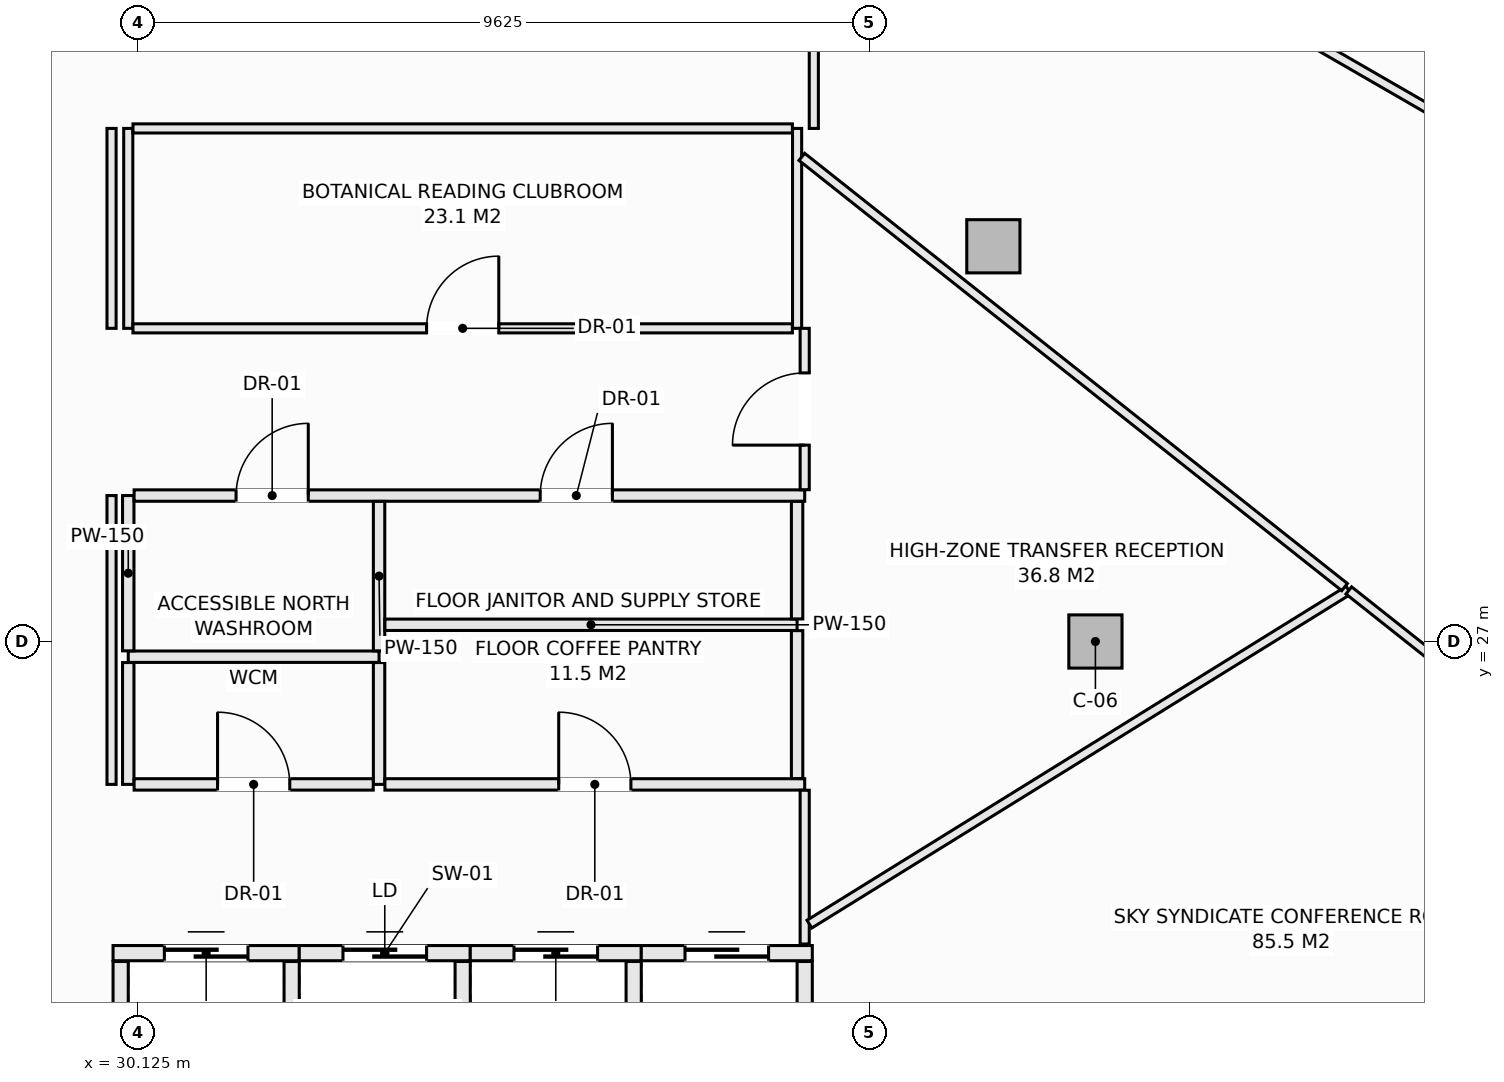
"""IFC4 building model, lengths in metres.
Left out: names, types, materials, properties, quantities, classifications, styles, units other than length and angle.
Written with IfcOpenShell. Run it as: python <this file> out.ifc"""

import sys

from ifc_helpers import new_model, si_unit, direction, frame, frame_2d, origin, origin_2d, place, context, subcontext, project, spatial, rectangle, extrude, element, fill, save


model = new_model("IFC4")
c1 = context("Model", 3, precision=1e-05, world=origin(), true_north=direction((0.0, 1.0)))
c2 = subcontext(c1, "Body", "Model", "MODEL_VIEW")
j1 = project(units=[si_unit("LENGTHUNIT", "METRE"), si_unit("PLANEANGLEUNIT", "RADIAN")], contexts=[c1])
p1 = place(None, origin())
s1 = spatial("IfcSite", under=j1, at=p1, CompositionType="ELEMENT")
p2 = place(p1, origin())
s2 = spatial("IfcBuilding", under=s1, at=p2, CompositionType="ELEMENT")
p3 = place(p2, frame((0.0, 0.0, 191.9)))
s3 = spatial("IfcBuildingStorey", under=s2, at=p3, CompositionType="ELEMENT", Elevation=191.9)
for number, where, z_axis, x_axis in (
    (1, (42.725, 27.0, -0.28), (0.0, 0.0, 1.0), (1.0, 0.0, 0.0)),
    (2, (41.382, 32.199, -0.28), (0.0, 0.0, 1.0), (1.0, 0.0, 0.0)),
):
    element("IfcColumn", number, at=place(p3, frame(where, z_axis=z_axis, x_axis=x_axis)), inside=s3, PredefinedType="COLUMN", context=c2, shape_type="SweptSolid", body=[
        extrude(rectangle(XDim=0.7, YDim=0.7, at=origin_2d()), origin(), (0.0, 0.0, 1.0), 4.51),
    ])
p4 = place(p3, frame((29.8, 22.9, 0.0), z_axis=(0.0, 0.0, 1.0), x_axis=(1.0, 0.0, 0.0)))
e3 = element("IfcWall", 3, at=p4, inside=s3, PredefinedType="SOLIDWALL", context=c2, shape_type="SweptSolid", body=[
    extrude(rectangle(XDim=2.45, YDim=0.2, at=frame_2d((1.225, 0.0))), origin(), (0.0, 0.0, 1.0), 4.23),
])
p5 = place(p4, frame((0.675, 0.0, 0.0)))
e4 = element("IfcOpeningElement", 4, at=p5, cuts=e3, PredefinedType="OPENING", context=c2, shape_type="SweptSolid", body=[
    extrude(rectangle(XDim=1.1, YDim=2.2, at=frame_2d((0.55, 1.1))), frame((0.0, 0.11, 0.0), z_axis=(0.0, -1.0, 0.0), x_axis=(1.0, 0.0, 0.0)), (0.0, 0.0, 1.0), 0.22),
])
for number, where, z_axis, x_axis in (
    (5, (29.9, 20.36, 0.0), (0.0, 0.0, 1.0), (0.0, 1.0, 0.0)),
    (6, (32.15, 20.36, 0.0), (0.0, 0.0, 1.0), (0.0, 1.0, 0.0)),
):
    element("IfcWall", number, at=place(p3, frame(where, z_axis=z_axis, x_axis=x_axis)), inside=s3, PredefinedType="SOLIDWALL", context=c2, shape_type="SweptSolid", body=[
        extrude(rectangle(XDim=2.43, YDim=0.2, at=frame_2d((1.215, 0.0))), origin(), (0.0, 0.0, 1.0), 4.23),
    ])
p6 = place(p3, frame((32.25, 22.9, 0.0), z_axis=(0.0, 0.0, 1.0), x_axis=(1.0, 0.0, 0.0)))
e7 = element("IfcWall", 7, at=p6, inside=s3, PredefinedType="SOLIDWALL", context=c2, shape_type="SweptSolid", body=[
    extrude(rectangle(XDim=2.25, YDim=0.2, at=frame_2d((1.125, 0.0))), origin(), (0.0, 0.0, 1.0), 4.23),
])
p7 = place(p6, frame((0.575, 0.0, 0.0)))
e8 = element("IfcOpeningElement", 8, at=p7, cuts=e7, PredefinedType="OPENING", context=c2, shape_type="SweptSolid", body=[
    extrude(rectangle(XDim=1.1, YDim=2.2, at=frame_2d((0.55, 1.1))), frame((0.0, 0.11, 0.0), z_axis=(0.0, -1.0, 0.0), x_axis=(1.0, 0.0, 0.0)), (0.0, 0.0, 1.0), 0.22),
])
p8 = place(p3, frame((34.4, 20.36, 0.0), z_axis=(0.0, 0.0, 1.0), x_axis=(0.0, 1.0, 0.0)))
e9 = element("IfcWall", 9, at=p8, inside=s3, PredefinedType="SOLIDWALL", context=c2, shape_type="SweptSolid", body=[
    extrude(rectangle(XDim=2.43, YDim=0.2, at=frame_2d((1.215, 0.0))), origin(), (0.0, 0.0, 1.0), 4.23),
])
p9 = place(p3, frame((34.5, 22.9, 0.0), z_axis=(0.0, 0.0, 1.0), x_axis=(1.0, 0.0, 0.0)))
e10 = element("IfcWall", 10, at=p9, inside=s3, PredefinedType="SOLIDWALL", context=c2, shape_type="SweptSolid", body=[
    extrude(rectangle(XDim=2.25, YDim=0.2, at=frame_2d((1.125, 0.0))), origin(), (0.0, 0.0, 1.0), 4.23),
])
p10 = place(p9, frame((0.575, 0.0, 0.0)))
e11 = element("IfcOpeningElement", 11, at=p10, cuts=e10, PredefinedType="OPENING", context=c2, shape_type="SweptSolid", body=[
    extrude(rectangle(XDim=1.1, YDim=2.2, at=frame_2d((0.55, 1.1))), frame((0.0, 0.11, 0.0), z_axis=(0.0, -1.0, 0.0), x_axis=(1.0, 0.0, 0.0)), (0.0, 0.0, 1.0), 0.22),
])
p11 = place(p3, frame((36.65, 20.36, 0.0), z_axis=(0.0, 0.0, 1.0), x_axis=(0.0, 1.0, 0.0)))
e12 = element("IfcWall", 12, at=p11, inside=s3, PredefinedType="SOLIDWALL", context=c2, shape_type="SweptSolid", body=[
    extrude(rectangle(XDim=2.43, YDim=0.2, at=frame_2d((1.215, 0.0))), origin(), (0.0, 0.0, 1.0), 4.23),
])
p12 = place(p3, frame((36.75, 22.9, 0.0), z_axis=(0.0, 0.0, 1.0), x_axis=(1.0, 0.0, 0.0)))
e13 = element("IfcWall", 13, at=p12, inside=s3, PredefinedType="SOLIDWALL", context=c2, shape_type="SweptSolid", body=[
    extrude(rectangle(XDim=2.25, YDim=0.2, at=frame_2d((1.125, 0.0))), origin(), (0.0, 0.0, 1.0), 4.23),
])
p13 = place(p12, frame((0.575, 0.0, 0.0)))
e14 = element("IfcOpeningElement", 14, at=p13, cuts=e13, PredefinedType="OPENING", context=c2, shape_type="SweptSolid", body=[
    extrude(rectangle(XDim=1.1, YDim=2.2, at=frame_2d((0.55, 1.1))), frame((0.0, 0.11, 0.0), z_axis=(0.0, -1.0, 0.0), x_axis=(1.0, 0.0, 0.0)), (0.0, 0.0, 1.0), 0.22),
])
p14 = place(p3, frame((38.9, 20.36, 0.0), z_axis=(0.0, 0.0, 1.0), x_axis=(0.0, 1.0, 0.0)))
e15 = element("IfcWall", 15, at=p14, inside=s3, PredefinedType="SOLIDWALL", context=c2, shape_type="SweptSolid", body=[
    extrude(rectangle(XDim=2.43, YDim=0.2, at=frame_2d((1.215, 0.0))), origin(), (0.0, 0.0, 1.0), 4.23),
])
p15 = place(p3, frame((30.0, 26.8, 0.0), z_axis=(0.0, 0.0, 1.0), x_axis=(1.0, 0.0, 0.0)))
e16 = element("IfcWall", 16, at=p15, inside=s3, PredefinedType="PARTITIONING", context=c2, shape_type="SweptSolid", body=[
    extrude(rectangle(XDim=3.3, YDim=0.15, at=frame_2d((1.65, 0.0))), origin(), (0.0, 0.0, 1.0), 4.23),
])
p16 = place(p3, frame((30.0, 25.12, 0.0), z_axis=(0.0, 0.0, 1.0), x_axis=(0.0, 1.0, 0.0)))
e17 = element("IfcWall", 17, at=p16, inside=s3, PredefinedType="PARTITIONING", context=c2, shape_type="SweptSolid", body=[
    extrude(rectangle(XDim=1.603, YDim=0.15, at=frame_2d((0.801, 0.0))), origin(), (0.0, 0.0, 1.0), 4.23),
])
p17 = place(p3, frame((30.0, 26.877, 0.0), z_axis=(0.0, 0.0, 1.0), x_axis=(0.0, 1.0, 0.0)))
e18 = element("IfcWall", 18, at=p17, inside=s3, PredefinedType="PARTITIONING", context=c2, shape_type="SweptSolid", body=[
    extrude(rectangle(XDim=2.043, YDim=0.15, at=frame_2d((1.021, 0.0))), origin(), (0.0, 0.0, 1.0), 4.23),
])
p18 = place(p3, frame((30.0, 31.12, 0.0), z_axis=(0.0, 0.0, 1.0), x_axis=(0.0, 1.0, 0.0)))
e19 = element("IfcWall", 19, at=p18, inside=s3, PredefinedType="PARTITIONING", context=c2, shape_type="SweptSolid", body=[
    extrude(rectangle(XDim=2.63, YDim=0.12, at=frame_2d((1.315, 0.0))), origin(), (0.0, 0.0, 1.0), 4.23),
])
p19 = place(p3, frame((30.077, 28.92, 0.0), z_axis=(0.0, 0.0, 1.0), x_axis=(1.0, 0.0, 0.0)))
e20 = element("IfcWall", 20, at=p19, inside=s3, PredefinedType="PARTITIONING", context=c2, shape_type="SweptSolid", body=[
    extrude(rectangle(XDim=8.823, YDim=0.15, at=frame_2d((4.412, 0.0))), origin(), (0.0, 0.0, 1.0), 4.23),
])
p20 = place(p19, frame((1.342, 0.0, 0.0)))
e21 = element("IfcOpeningElement", 21, at=p20, cuts=e20, PredefinedType="OPENING", context=c2, shape_type="SweptSolid", body=[
    extrude(rectangle(XDim=0.95, YDim=2.1, at=frame_2d((0.475, 1.05))), frame((0.0, 0.085, 0.0), z_axis=(0.0, -1.0, 0.0), x_axis=(1.0, 0.0, 0.0)), (0.0, 0.0, 1.0), 0.17),
])
p21 = place(p19, frame((5.343, 0.0, 0.0)))
e22 = element("IfcOpeningElement", 22, at=p21, cuts=e20, PredefinedType="OPENING", context=c2, shape_type="SweptSolid", body=[
    extrude(rectangle(XDim=0.95, YDim=2.1, at=frame_2d((0.475, 1.05))), frame((0.0, 0.085, 0.0), z_axis=(0.0, -1.0, 0.0), x_axis=(1.0, 0.0, 0.0)), (0.0, 0.0, 1.0), 0.17),
])
p22 = place(p3, frame((33.3, 25.12, 0.0), z_axis=(0.0, 0.0, 1.0), x_axis=(0.0, 1.0, 0.0)))
e23 = element("IfcWall", 23, at=p22, inside=s3, PredefinedType="PARTITIONING", context=c2, shape_type="SweptSolid", body=[
    extrude(rectangle(XDim=1.603, YDim=0.15, at=frame_2d((0.801, 0.0))), origin(), (0.0, 0.0, 1.0), 4.23),
])
p23 = place(p3, frame((33.3, 26.877, 0.0), z_axis=(0.0, 0.0, 1.0), x_axis=(0.0, 1.0, 0.0)))
e24 = element("IfcWall", 24, at=p23, inside=s3, PredefinedType="PARTITIONING", context=c2, shape_type="SweptSolid", body=[
    extrude(rectangle(XDim=1.966, YDim=0.15, at=frame_2d((0.983, 0.0))), origin(), (0.0, 0.0, 1.0), 4.23),
])
p24 = place(p3, frame((30.077, 25.12, 0.0), z_axis=(0.0, 0.0, 1.0), x_axis=(1.0, 0.0, 0.0)))
e25 = element("IfcWall", 25, at=p24, inside=s3, PredefinedType="PARTITIONING", context=c2, shape_type="SweptSolid", body=[
    extrude(rectangle(XDim=3.146, YDim=0.15, at=frame_2d((1.573, 0.0))), origin(), (0.0, 0.0, 1.0), 4.23),
])
p25 = place(p24, frame((1.098, 0.0, 0.0)))
e26 = element("IfcOpeningElement", 26, at=p25, cuts=e25, PredefinedType="OPENING", context=c2, shape_type="SweptSolid", body=[
    extrude(rectangle(XDim=0.95, YDim=2.1, at=frame_2d((0.475, 1.05))), frame((0.0, 0.085, 0.0), z_axis=(0.0, -1.0, 0.0), x_axis=(1.0, 0.0, 0.0)), (0.0, 0.0, 1.0), 0.17),
])
p26 = place(p3, frame((33.377, 25.12, 0.0), z_axis=(0.0, 0.0, 1.0), x_axis=(1.0, 0.0, 0.0)))
e27 = element("IfcWall", 27, at=p26, inside=s3, PredefinedType="PARTITIONING", context=c2, shape_type="SweptSolid", body=[
    extrude(rectangle(XDim=5.523, YDim=0.15, at=frame_2d((2.761, 0.0))), origin(), (0.0, 0.0, 1.0), 4.23),
])
p27 = place(p26, frame((2.287, 0.0, 0.0)))
e28 = element("IfcOpeningElement", 28, at=p27, cuts=e27, PredefinedType="OPENING", context=c2, shape_type="SweptSolid", body=[
    extrude(rectangle(XDim=0.95, YDim=2.1, at=frame_2d((0.475, 1.05))), frame((0.0, 0.085, 0.0), z_axis=(0.0, -1.0, 0.0), x_axis=(1.0, 0.0, 0.0)), (0.0, 0.0, 1.0), 0.17),
])
p28 = place(p3, frame((33.377, 27.22, 0.0), z_axis=(0.0, 0.0, 1.0), x_axis=(1.0, 0.0, 0.0)))
e29 = element("IfcWall", 29, at=p28, inside=s3, PredefinedType="PARTITIONING", context=c2, shape_type="SweptSolid", body=[
    extrude(rectangle(XDim=5.423, YDim=0.15, at=frame_2d((2.711, 0.0))), origin(), (0.0, 0.0, 1.0), 4.23),
])
p29 = place(p3, frame((38.8, 25.197, 0.0), z_axis=(0.0, 0.0, 1.0), x_axis=(0.0, 1.0, 0.0)))
e30 = element("IfcWall", 30, at=p29, inside=s3, PredefinedType="PARTITIONING", context=c2, shape_type="SweptSolid", body=[
    extrude(rectangle(XDim=1.946, YDim=0.15, at=frame_2d((0.973, 0.0))), origin(), (0.0, 0.0, 1.0), 4.23),
])
p30 = place(p3, frame((38.8, 27.297, 0.0), z_axis=(0.0, 0.0, 1.0), x_axis=(0.0, 1.0, 0.0)))
e31 = element("IfcWall", 31, at=p30, inside=s3, PredefinedType="PARTITIONING", context=c2, shape_type="SweptSolid", body=[
    extrude(rectangle(XDim=1.546, YDim=0.15, at=frame_2d((0.773, 0.0))), origin(), (0.0, 0.0, 1.0), 4.23),
])
p31 = place(p3, frame((38.8, 31.12, 0.0), z_axis=(0.0, 0.0, 1.0), x_axis=(0.0, 1.0, 0.0)))
e32 = element("IfcWall", 32, at=p31, inside=s3, PredefinedType="PARTITIONING", context=c2, shape_type="SweptSolid", body=[
    extrude(rectangle(XDim=2.63, YDim=0.12, at=frame_2d((1.315, 0.0))), origin(), (0.0, 0.0, 1.0), 4.23),
])
p32 = place(p3, frame((30.062, 31.12, 0.0), z_axis=(0.0, 0.0, 1.0), x_axis=(1.0, 0.0, 0.0)))
e33 = element("IfcWall", 33, at=p32, inside=s3, PredefinedType="PARTITIONING", context=c2, shape_type="SweptSolid", body=[
    extrude(rectangle(XDim=8.676, YDim=0.12, at=frame_2d((4.338, 0.0))), origin(), (0.0, 0.0, 1.0), 4.23),
])
p33 = place(p32, frame((3.863, 0.0, 0.0)))
e34 = element("IfcOpeningElement", 34, at=p33, cuts=e33, PredefinedType="OPENING", context=c2, shape_type="SweptSolid", body=[
    extrude(rectangle(XDim=0.95, YDim=2.1, at=frame_2d((0.475, 1.05))), frame((0.0, 0.07, 0.0), z_axis=(0.0, -1.0, 0.0), x_axis=(1.0, 0.0, 0.0)), (0.0, 0.0, 1.0), 0.14),
])
p34 = place(p3, frame((30.062, 33.75, 0.0), z_axis=(0.0, 0.0, 1.0), x_axis=(1.0, 0.0, 0.0)))
e35 = element("IfcWall", 35, at=p34, inside=s3, PredefinedType="PARTITIONING", context=c2, shape_type="SweptSolid", body=[
    extrude(rectangle(XDim=8.676, YDim=0.12, at=frame_2d((4.338, 0.0))), origin(), (0.0, 0.0, 1.0), 4.23),
])
p35 = place(p3, frame((39.02, 33.75, 0.0), z_axis=(0.0, 0.0, 1.0), x_axis=(0.0, 1.0, 0.0)))
e36 = element("IfcWall", 36, at=p35, inside=s3, PredefinedType="PARTITIONING", context=c2, shape_type="SweptSolid", body=[
    extrude(rectangle(XDim=2.0, YDim=0.12, at=frame_2d((1.0, 0.0))), origin(), (0.0, 0.0, 1.0), 4.23),
])
p36 = place(p3, frame((29.78, 25.12, 0.0), z_axis=(0.0, 0.0, 1.0), x_axis=(0.0, 1.0, 0.0)))
e37 = element("IfcWall", 37, at=p36, inside=s3, PredefinedType="PARTITIONING", context=c2, shape_type="SweptSolid", body=[
    extrude(rectangle(XDim=3.8, YDim=0.12, at=frame_2d((1.9, 0.0))), origin(), (0.0, 0.0, 1.0), 4.23),
])
p37 = place(p3, frame((29.78, 31.12, 0.0), z_axis=(0.0, 0.0, 1.0), x_axis=(0.0, 1.0, 0.0)))
e38 = element("IfcWall", 38, at=p37, inside=s3, PredefinedType="PARTITIONING", context=c2, shape_type="SweptSolid", body=[
    extrude(rectangle(XDim=2.63, YDim=0.12, at=frame_2d((1.315, 0.0))), origin(), (0.0, 0.0, 1.0), 4.23),
])
p38 = place(p3, frame((38.9, 23.02, 0.0), z_axis=(0.0, 0.0, 1.0), x_axis=(0.0, 1.0, 0.0)))
e39 = element("IfcWall", 39, at=p38, inside=s3, PredefinedType="PARTITIONING", context=c2, shape_type="SweptSolid", body=[
    extrude(rectangle(XDim=2.023, YDim=0.12, at=frame_2d((1.011, 0.0))), origin(), (0.0, 0.0, 1.0), 4.23),
])
p39 = place(p3, frame((38.9, 28.997, 0.0), z_axis=(0.0, 0.0, 1.0), x_axis=(0.0, 1.0, 0.0)))
e40 = element("IfcWall", 40, at=p39, inside=s3, PredefinedType="PARTITIONING", context=c2, shape_type="SweptSolid", body=[
    extrude(rectangle(XDim=2.123, YDim=0.12, at=frame_2d((1.062, 0.0))), origin(), (0.0, 0.0, 1.0), 4.23),
])
p40 = place(p39, frame((0.586, 0.0, 0.0)))
e41 = element("IfcOpeningElement", 41, at=p40, cuts=e40, PredefinedType="OPENING", context=c2, shape_type="SweptSolid", body=[
    extrude(rectangle(XDim=0.95, YDim=2.1, at=frame_2d((0.475, 1.05))), frame((0.0, 0.07, 0.0), z_axis=(0.0, -1.0, 0.0), x_axis=(1.0, 0.0, 0.0)), (0.0, 0.0, 1.0), 0.14),
])
p41 = place(p3, frame((38.962, 23.281, 0.0), z_axis=(0.0, 0.0, 1.0), x_axis=(0.850146039188, 0.526546970415, 0.0)))
e42 = element("IfcWall", 42, at=p41, inside=s3, PredefinedType="PARTITIONING", context=c2, shape_type="SweptSolid", body=[
    extrude(rectangle(XDim=8.345, YDim=0.12, at=frame_2d((4.172, 0.0))), origin(), (0.0, 0.0, 1.0), 3.678),
])
p42 = place(p3, frame((36.012, 13.357, 0.0), z_axis=(0.0, 0.0, 1.0), x_axis=(0.853236403134, 0.521524343024, 0.0)))
e43 = element("IfcWall", 43, at=p42, inside=s3, PredefinedType="PARTITIONING", context=c2, shape_type="SweptSolid", body=[
    extrude(rectangle(XDim=18.599, YDim=0.12, at=frame_2d((9.299, 0.0))), origin(), (0.0, 0.0, 1.0), 3.678),
])
p43 = place(p3, frame((38.862, 33.376, 0.0), z_axis=(0.0, 0.0, 1.0), x_axis=(0.78368115762, -0.621163298329, 0.0)))
e44 = element("IfcWall", 44, at=p43, inside=s3, PredefinedType="PARTITIONING", context=c2, shape_type="SweptSolid", body=[
    extrude(rectangle(XDim=9.113, YDim=0.12, at=frame_2d((4.556, 0.0))), origin(), (0.0, 0.0, 1.0), 4.23),
])
p44 = place(p3, frame((46.059, 27.672, 0.0), z_axis=(0.0, 0.0, 1.0), x_axis=(0.783665181, -0.621183454455, 0.0)))
e45 = element("IfcWall", 45, at=p44, inside=s3, PredefinedType="PARTITIONING", context=c2, shape_type="SweptSolid", body=[
    extrude(rectangle(XDim=7.364, YDim=0.12, at=frame_2d((3.682, 0.0))), origin(), (0.0, 0.0, 1.0), 3.678),
])
p45 = place(p3, frame((35.876, 40.488, 0.0), z_axis=(0.0, 0.0, 1.0), x_axis=(0.866056021905, -0.49994696411, 0.0)))
e46 = element("IfcWall", 46, at=p45, inside=s3, PredefinedType="PARTITIONING", context=c2, shape_type="SweptSolid", body=[
    extrude(rectangle(XDim=21.211, YDim=0.12, at=frame_2d((10.605, 0.0))), origin(), (0.0, 0.0, 1.0), 4.23),
])
p46 = place(p5, origin())
e47 = element("IfcDoor", 47, at=p46, inside=s3, OperationType="SLIDING_TO_LEFT", PredefinedType="DOOR", context=c2, shape_type="SweptSolid", body=[
    extrude(rectangle(XDim=1.1, YDim=2.2, at=frame_2d((0.55, 1.1))), frame((0.0, 0.025, 0.0), z_axis=(0.0, -1.0, 0.0), x_axis=(1.0, 0.0, 0.0)), (0.0, 0.0, 1.0), 0.05),
])
fill(e4, e47)
p47 = place(p7, origin())
e48 = element("IfcDoor", 48, at=p47, inside=s3, OperationType="SLIDING_TO_LEFT", PredefinedType="DOOR", context=c2, shape_type="SweptSolid", body=[
    extrude(rectangle(XDim=1.1, YDim=2.2, at=frame_2d((0.55, 1.1))), frame((0.0, 0.025, 0.0), z_axis=(0.0, -1.0, 0.0), x_axis=(1.0, 0.0, 0.0)), (0.0, 0.0, 1.0), 0.05),
])
fill(e8, e48)
p48 = place(p10, origin())
e49 = element("IfcDoor", 49, at=p48, inside=s3, OperationType="SLIDING_TO_LEFT", PredefinedType="DOOR", context=c2, shape_type="SweptSolid", body=[
    extrude(rectangle(XDim=1.1, YDim=2.2, at=frame_2d((0.55, 1.1))), frame((0.0, 0.025, 0.0), z_axis=(0.0, -1.0, 0.0), x_axis=(1.0, 0.0, 0.0)), (0.0, 0.0, 1.0), 0.05),
])
fill(e11, e49)
p49 = place(p13, origin())
e50 = element("IfcDoor", 50, at=p49, inside=s3, OperationType="SLIDING_TO_LEFT", PredefinedType="DOOR", context=c2, shape_type="SweptSolid", body=[
    extrude(rectangle(XDim=1.1, YDim=2.2, at=frame_2d((0.55, 1.1))), frame((0.0, 0.025, 0.0), z_axis=(0.0, -1.0, 0.0), x_axis=(1.0, 0.0, 0.0)), (0.0, 0.0, 1.0), 0.05),
])
fill(e14, e50)
p50 = place(p20, origin())
e51 = element("IfcDoor", 51, at=p50, inside=s3, OperationType="SINGLE_SWING_RIGHT", PredefinedType="DOOR", context=c2, shape_type="SweptSolid", body=[
    extrude(rectangle(XDim=0.95, YDim=2.1, at=frame_2d((0.475, 1.05))), frame((0.0, 0.025, 0.0), z_axis=(0.0, -1.0, 0.0), x_axis=(1.0, 0.0, 0.0)), (0.0, 0.0, 1.0), 0.05),
])
fill(e21, e51)
p51 = place(p25, origin())
e52 = element("IfcDoor", 52, at=p51, inside=s3, OperationType="SINGLE_SWING_LEFT", PredefinedType="DOOR", context=c2, shape_type="SweptSolid", body=[
    extrude(rectangle(XDim=0.95, YDim=2.1, at=frame_2d((0.475, 1.05))), frame((0.0, 0.025, 0.0), z_axis=(0.0, -1.0, 0.0), x_axis=(1.0, 0.0, 0.0)), (0.0, 0.0, 1.0), 0.05),
])
fill(e26, e52)
p52 = place(p21, origin())
e53 = element("IfcDoor", 53, at=p52, inside=s3, OperationType="SINGLE_SWING_RIGHT", PredefinedType="DOOR", context=c2, shape_type="SweptSolid", body=[
    extrude(rectangle(XDim=0.95, YDim=2.1, at=frame_2d((0.475, 1.05))), frame((0.0, 0.025, 0.0), z_axis=(0.0, -1.0, 0.0), x_axis=(1.0, 0.0, 0.0)), (0.0, 0.0, 1.0), 0.05),
])
fill(e22, e53)
p53 = place(p27, origin())
e54 = element("IfcDoor", 54, at=p53, inside=s3, OperationType="SINGLE_SWING_LEFT", PredefinedType="DOOR", context=c2, shape_type="SweptSolid", body=[
    extrude(rectangle(XDim=0.95, YDim=2.1, at=frame_2d((0.475, 1.05))), frame((0.0, 0.025, 0.0), z_axis=(0.0, -1.0, 0.0), x_axis=(1.0, 0.0, 0.0)), (0.0, 0.0, 1.0), 0.05),
])
fill(e28, e54)
p54 = place(p33, origin())
e55 = element("IfcDoor", 55, at=p54, inside=s3, OperationType="SINGLE_SWING_RIGHT", PredefinedType="DOOR", context=c2, shape_type="SweptSolid", body=[
    extrude(rectangle(XDim=0.95, YDim=2.1, at=frame_2d((0.475, 1.05))), frame((0.0, 0.025, 0.0), z_axis=(0.0, -1.0, 0.0), x_axis=(1.0, 0.0, 0.0)), (0.0, 0.0, 1.0), 0.05),
])
fill(e34, e55)
p55 = place(p40, origin())
e56 = element("IfcDoor", 56, at=p55, inside=s3, OperationType="SINGLE_SWING_LEFT", PredefinedType="DOOR", context=c2, shape_type="SweptSolid", body=[
    extrude(rectangle(XDim=0.95, YDim=2.1, at=frame_2d((0.475, 1.05))), frame((0.0, 0.025, 0.0), z_axis=(0.0, -1.0, 0.0), x_axis=(1.0, 0.0, 0.0)), (0.0, 0.0, 1.0), 0.05),
])
fill(e41, e56)
save(model, sys.argv[1])
